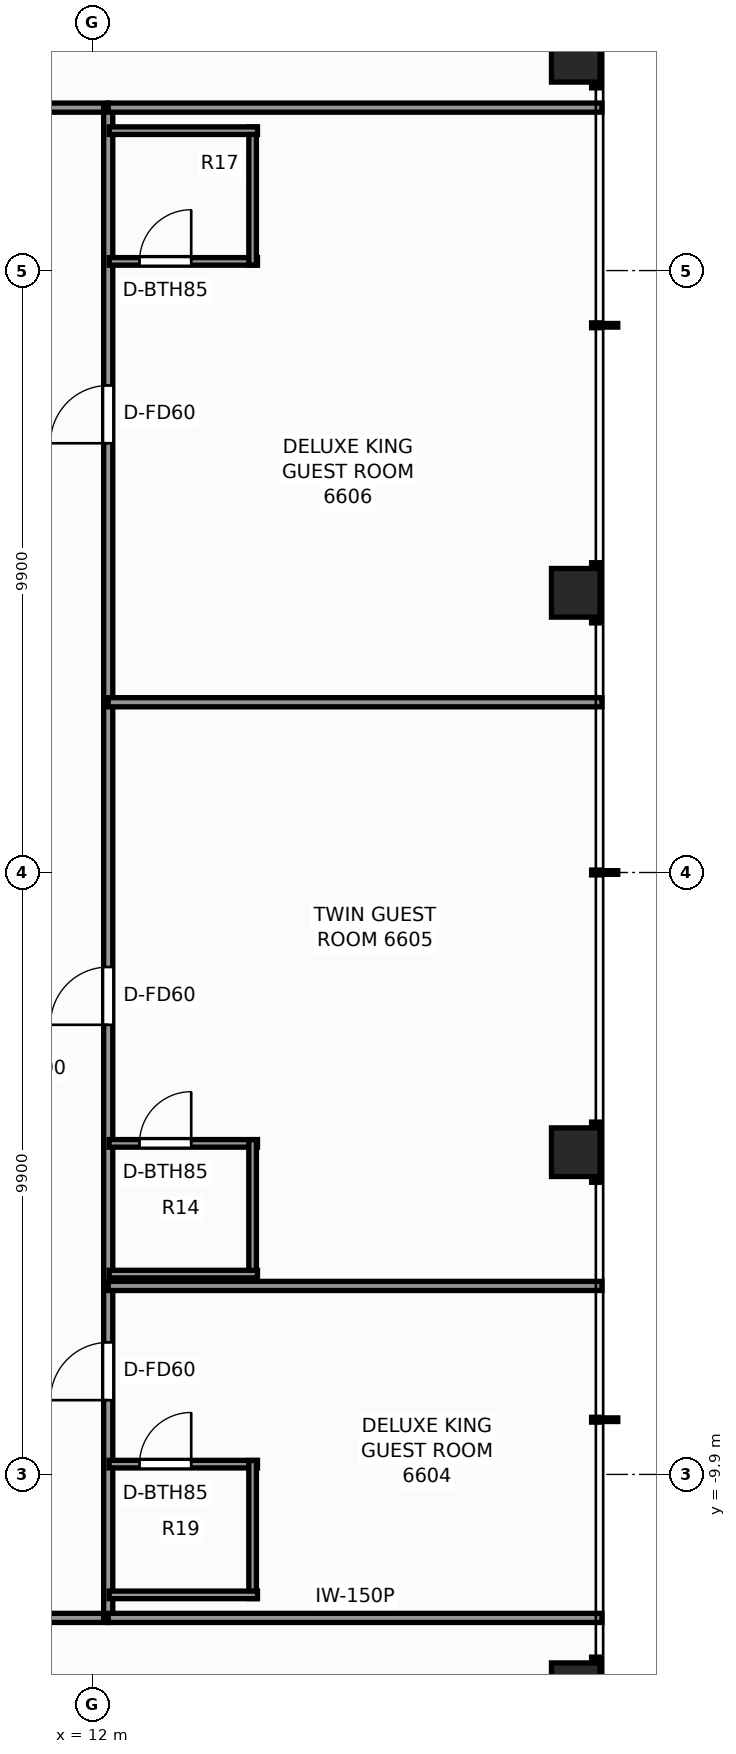
"""IFC4 building model, lengths in metres.
Left out: names, types, materials, properties, quantities, classifications, styles, units other than length and angle.
Written with IfcOpenShell. Run it as: python <this file> out.ifc"""

import sys

from ifc_helpers import new_model, si_unit, direction, frame, frame_2d, origin, origin_2d, place, context, subcontext, project, spatial, rectangle, extrude, element, fill, save


model = new_model("IFC4")
c1 = context("Model", 3, precision=1e-05, world=origin(), true_north=direction((0.0, 1.0)))
c2 = subcontext(c1, "Body", "Model", "MODEL_VIEW")
j1 = project(units=[si_unit("LENGTHUNIT", "METRE"), si_unit("PLANEANGLEUNIT", "RADIAN")], contexts=[c1])
p1 = place(None, origin())
s1 = spatial("IfcSite", under=j1, at=p1, CompositionType="ELEMENT")
p2 = place(p1, origin())
s2 = spatial("IfcBuilding", under=s1, at=p2, CompositionType="ELEMENT")
p3 = place(p2, frame((0.0, 0.0, 226.2)))
s3 = spatial("IfcBuildingStorey", under=s2, at=p3, CompositionType="ELEMENT", Elevation=226.2)
for number, where, z_axis, x_axis in (
    (1, (19.95, -13.4, 0.0), (0.0, 0.0, 1.0), (1.0, 0.0, 0.0)),
    (2, (19.95, -4.6, 0.0), (0.0, 0.0, 1.0), (1.0, 0.0, 0.0)),
    (3, (19.95, 4.6, 0.0), (0.0, 0.0, 1.0), (1.0, 0.0, 0.0)),
    (4, (19.95, 13.4, 0.0), (0.0, 0.0, 1.0), (1.0, 0.0, 0.0)),
):
    element("IfcColumn", number, at=place(p3, frame(where, z_axis=z_axis, x_axis=x_axis)), inside=s3, PredefinedType="COLUMN", context=c2, shape_type="SweptSolid", body=[
        extrude(rectangle(XDim=0.8, YDim=0.8, at=origin_2d()), origin(), (0.0, 0.0, 1.0), 3.3),
    ])
p4 = place(p3, frame((-12.42, -12.26, 0.0), z_axis=(0.0, 0.0, 1.0), x_axis=(1.0, 0.0, 0.0)))
e5 = element("IfcWall", 5, at=p4, inside=s3, PredefinedType="PARTITIONING", context=c2, shape_type="SweptSolid", body=[
    extrude(rectangle(XDim=24.68, YDim=0.15, at=frame_2d((12.34, 0.0))), origin(), (0.0, 0.0, 1.0), 2.369),
])
p5 = place(p4, frame((3.267, 0.0, 0.0)))
e6 = element("IfcOpeningElement", 6, at=p5, cuts=e5, PredefinedType="OPENING", context=c2, shape_type="SweptSolid", body=[
    extrude(rectangle(XDim=0.9, YDim=2.06, at=frame_2d((0.45, 1.03))), frame((0.0, 0.085, 0.0), z_axis=(0.0, -1.0, 0.0), x_axis=(1.0, 0.0, 0.0)), (0.0, 0.0, 1.0), 0.17),
])
p6 = place(p4, frame((9.94, 0.0, 0.0)))
e7 = element("IfcOpeningElement", 7, at=p6, cuts=e5, PredefinedType="OPENING", context=c2, shape_type="SweptSolid", body=[
    extrude(rectangle(XDim=0.9, YDim=2.06, at=frame_2d((0.45, 1.03))), frame((0.0, 0.085, 0.0), z_axis=(0.0, -1.0, 0.0), x_axis=(1.0, 0.0, 0.0)), (0.0, 0.0, 1.0), 0.17),
])
p7 = place(p4, frame((15.177, 0.0, 0.0)))
e8 = element("IfcOpeningElement", 8, at=p7, cuts=e5, PredefinedType="OPENING", context=c2, shape_type="SweptSolid", body=[
    extrude(rectangle(XDim=0.9, YDim=2.06, at=frame_2d((0.45, 1.03))), frame((0.0, 0.085, 0.0), z_axis=(0.0, -1.0, 0.0), x_axis=(1.0, 0.0, 0.0)), (0.0, 0.0, 1.0), 0.17),
])
p8 = place(p4, frame((18.4, 0.0, 0.0)))
e9 = element("IfcOpeningElement", 9, at=p8, cuts=e5, PredefinedType="OPENING", context=c2, shape_type="SweptSolid", body=[
    extrude(rectangle(XDim=0.95, YDim=2.06, at=frame_2d((0.475, 1.03))), frame((0.0, 0.085, 0.0), z_axis=(0.0, -1.0, 0.0), x_axis=(1.0, 0.0, 0.0)), (0.0, 0.0, 1.0), 0.17),
])
p9 = place(p4, frame((20.85, 0.0, 0.0)))
e10 = element("IfcOpeningElement", 10, at=p9, cuts=e5, PredefinedType="OPENING", context=c2, shape_type="SweptSolid", body=[
    extrude(rectangle(XDim=0.9, YDim=2.06, at=frame_2d((0.45, 1.03))), frame((0.0, 0.085, 0.0), z_axis=(0.0, -1.0, 0.0), x_axis=(1.0, 0.0, 0.0)), (0.0, 0.0, 1.0), 0.17),
])
p10 = place(p3, frame((-12.42, 12.58, 0.0), z_axis=(0.0, 0.0, 1.0), x_axis=(1.0, 0.0, 0.0)))
e11 = element("IfcWall", 11, at=p10, inside=s3, PredefinedType="PARTITIONING", context=c2, shape_type="SweptSolid", body=[
    extrude(rectangle(XDim=24.68, YDim=0.15, at=frame_2d((12.34, 0.0))), origin(), (0.0, 0.0, 1.0), 2.369),
])
p11 = place(p10, frame((3.267, 0.0, 0.0)))
e12 = element("IfcOpeningElement", 12, at=p11, cuts=e11, PredefinedType="OPENING", context=c2, shape_type="SweptSolid", body=[
    extrude(rectangle(XDim=0.9, YDim=2.06, at=frame_2d((0.45, 1.03))), frame((0.0, 0.085, 0.0), z_axis=(0.0, -1.0, 0.0), x_axis=(1.0, 0.0, 0.0)), (0.0, 0.0, 1.0), 0.17),
])
p12 = place(p10, frame((9.915, 0.0, 0.0)))
e13 = element("IfcOpeningElement", 13, at=p12, cuts=e11, PredefinedType="OPENING", context=c2, shape_type="SweptSolid", body=[
    extrude(rectangle(XDim=0.95, YDim=2.06, at=frame_2d((0.475, 1.03))), frame((0.0, 0.085, 0.0), z_axis=(0.0, -1.0, 0.0), x_axis=(1.0, 0.0, 0.0)), (0.0, 0.0, 1.0), 0.17),
])
p13 = place(p10, frame((18.587, 0.0, 0.0)))
e14 = element("IfcOpeningElement", 14, at=p13, cuts=e11, PredefinedType="OPENING", context=c2, shape_type="SweptSolid", body=[
    extrude(rectangle(XDim=0.95, YDim=2.06, at=frame_2d((0.475, 1.03))), frame((0.0, 0.085, 0.0), z_axis=(0.0, -1.0, 0.0), x_axis=(1.0, 0.0, 0.0)), (0.0, 0.0, 1.0), 0.17),
])
p14 = place(p10, frame((20.85, 0.0, 0.0)))
e15 = element("IfcOpeningElement", 15, at=p14, cuts=e11, PredefinedType="OPENING", context=c2, shape_type="SweptSolid", body=[
    extrude(rectangle(XDim=0.9, YDim=2.06, at=frame_2d((0.45, 1.03))), frame((0.0, 0.085, 0.0), z_axis=(0.0, -1.0, 0.0), x_axis=(1.0, 0.0, 0.0)), (0.0, 0.0, 1.0), 0.17),
])
p15 = place(p3, frame((12.26, -12.26, 0.0), z_axis=(0.0, 0.0, 1.0), x_axis=(0.0, 1.0, 0.0)))
e16 = element("IfcWall", 16, at=p15, inside=s3, PredefinedType="PARTITIONING", context=c2, shape_type="SweptSolid", body=[
    extrude(rectangle(XDim=24.84, YDim=0.15, at=frame_2d((12.42, 0.0))), origin(), (0.0, 0.0, 1.0), 2.369),
])
p16 = place(p15, frame((3.581, 0.0, 0.0)))
e17 = element("IfcOpeningElement", 17, at=p16, cuts=e16, PredefinedType="OPENING", context=c2, shape_type="SweptSolid", body=[
    extrude(rectangle(XDim=0.95, YDim=2.06, at=frame_2d((0.475, 1.03))), frame((0.0, 0.085, 0.0), z_axis=(0.0, -1.0, 0.0), x_axis=(1.0, 0.0, 0.0)), (0.0, 0.0, 1.0), 0.17),
])
p17 = place(p15, frame((9.755, 0.0, 0.0)))
e18 = element("IfcOpeningElement", 18, at=p17, cuts=e16, PredefinedType="OPENING", context=c2, shape_type="SweptSolid", body=[
    extrude(rectangle(XDim=0.95, YDim=2.06, at=frame_2d((0.475, 1.03))), frame((0.0, 0.085, 0.0), z_axis=(0.0, -1.0, 0.0), x_axis=(1.0, 0.0, 0.0)), (0.0, 0.0, 1.0), 0.17),
])
p18 = place(p15, frame((19.32, 0.0, 0.0)))
e19 = element("IfcOpeningElement", 19, at=p18, cuts=e16, PredefinedType="OPENING", context=c2, shape_type="SweptSolid", body=[
    extrude(rectangle(XDim=0.95, YDim=2.06, at=frame_2d((0.475, 1.03))), frame((0.0, 0.085, 0.0), z_axis=(0.0, -1.0, 0.0), x_axis=(1.0, 0.0, 0.0)), (0.0, 0.0, 1.0), 0.17),
])
for number, where, z_axis, x_axis in (
    (20, (12.26, -12.26, 0.0), (0.0, 0.0, 1.0), (1.0, 0.0, 0.0)),
    (21, (12.26, 12.58, 0.0), (0.0, 0.0, 1.0), (1.0, 0.0, 0.0)),
):
    element("IfcWall", number, at=place(p3, frame(where, z_axis=z_axis, x_axis=x_axis)), inside=s3, PredefinedType="PARTITIONING", context=c2, shape_type="SweptSolid", body=[
        extrude(rectangle(XDim=8.12, YDim=0.15, at=frame_2d((4.06, 0.0))), origin(), (0.0, 0.0, 1.0), 2.369),
    ])
p19 = place(p3, frame((12.26, -6.8, 0.0), z_axis=(0.0, 0.0, 1.0), x_axis=(1.0, 0.0, 0.0)))
e22 = element("IfcWall", 22, at=p19, inside=s3, PredefinedType="PARTITIONING", context=c2, shape_type="SweptSolid", body=[
    extrude(rectangle(XDim=8.12, YDim=0.15, at=frame_2d((4.06, 0.0))), origin(), (0.0, 0.0, 1.0), 2.453),
])
p20 = place(p3, frame((12.275, -9.731, 0.0), z_axis=(0.0, 0.0, 1.0), x_axis=(1.0, 0.0, 0.0)))
e23 = element("IfcWall", 23, at=p20, inside=s3, PredefinedType="PARTITIONING", context=c2, shape_type="SweptSolid", body=[
    extrude(rectangle(XDim=2.44, YDim=0.125, at=frame_2d((1.22, 0.0))), origin(), (0.0, 0.0, 1.0), 3.08),
])
p21 = place(p20, frame((0.5, 0.0, 0.0)))
e24 = element("IfcOpeningElement", 24, at=p21, cuts=e23, PredefinedType="OPENING", context=c2, shape_type="SweptSolid", body=[
    extrude(rectangle(XDim=0.85, YDim=2.03, at=frame_2d((0.425, 1.015))), frame((0.0, 0.073, 0.0), z_axis=(0.0, -1.0, 0.0), x_axis=(1.0, 0.0, 0.0)), (0.0, 0.0, 1.0), 0.145),
])
p22 = place(p3, frame((14.635, -11.941, 0.0), z_axis=(0.0, 0.0, 1.0), x_axis=(0.0, 1.0, 0.0)))
e25 = element("IfcWall", 25, at=p22, inside=s3, PredefinedType="PARTITIONING", context=c2, shape_type="SweptSolid", body=[
    extrude(rectangle(XDim=2.27, YDim=0.125, at=frame_2d((1.135, 0.0))), origin(), (0.0, 0.0, 1.0), 2.369),
])
p23 = place(p3, frame((12.275, -11.881, 0.0), z_axis=(0.0, 0.0, 1.0), x_axis=(1.0, 0.0, 0.0)))
e26 = element("IfcWall", 26, at=p23, inside=s3, PredefinedType="PARTITIONING", context=c2, shape_type="SweptSolid", body=[
    extrude(rectangle(XDim=2.44, YDim=0.125, at=frame_2d((1.22, 0.0))), origin(), (0.0, 0.0, 1.0), 3.08),
])
p24 = place(p3, frame((12.26, 2.8, 0.0), z_axis=(0.0, 0.0, 1.0), x_axis=(1.0, 0.0, 0.0)))
e27 = element("IfcWall", 27, at=p24, inside=s3, PredefinedType="PARTITIONING", context=c2, shape_type="SweptSolid", body=[
    extrude(rectangle(XDim=8.12, YDim=0.15, at=frame_2d((4.06, 0.0))), origin(), (0.0, 0.0, 1.0), 2.453),
])
p25 = place(p3, frame((12.275, -4.455, 0.0), z_axis=(0.0, 0.0, 1.0), x_axis=(1.0, 0.0, 0.0)))
e28 = element("IfcWall", 28, at=p25, inside=s3, PredefinedType="PARTITIONING", context=c2, shape_type="SweptSolid", body=[
    extrude(rectangle(XDim=2.44, YDim=0.125, at=frame_2d((1.22, 0.0))), origin(), (0.0, 0.0, 1.0), 2.369),
])
p26 = place(p25, frame((0.5, 0.0, 0.0)))
e29 = element("IfcOpeningElement", 29, at=p26, cuts=e28, PredefinedType="OPENING", context=c2, shape_type="SweptSolid", body=[
    extrude(rectangle(XDim=0.85, YDim=2.03, at=frame_2d((0.425, 1.015))), frame((0.0, 0.073, 0.0), z_axis=(0.0, -1.0, 0.0), x_axis=(1.0, 0.0, 0.0)), (0.0, 0.0, 1.0), 0.145),
])
p27 = place(p3, frame((14.635, -6.665, 0.0), z_axis=(0.0, 0.0, 1.0), x_axis=(0.0, 1.0, 0.0)))
e30 = element("IfcWall", 30, at=p27, inside=s3, PredefinedType="PARTITIONING", context=c2, shape_type="SweptSolid", body=[
    extrude(rectangle(XDim=2.27, YDim=0.125, at=frame_2d((1.135, 0.0))), origin(), (0.0, 0.0, 1.0), 2.369),
])
p28 = place(p3, frame((12.275, -6.605, 0.0), z_axis=(0.0, 0.0, 1.0), x_axis=(1.0, 0.0, 0.0)))
e31 = element("IfcWall", 31, at=p28, inside=s3, PredefinedType="PARTITIONING", context=c2, shape_type="SweptSolid", body=[
    extrude(rectangle(XDim=2.44, YDim=0.125, at=frame_2d((1.22, 0.0))), origin(), (0.0, 0.0, 1.0), 3.08),
])
p29 = place(p3, frame((12.275, 10.051, 0.0), z_axis=(0.0, 0.0, 1.0), x_axis=(1.0, 0.0, 0.0)))
e32 = element("IfcWall", 32, at=p29, inside=s3, PredefinedType="PARTITIONING", context=c2, shape_type="SweptSolid", body=[
    extrude(rectangle(XDim=2.44, YDim=0.125, at=frame_2d((1.22, 0.0))), origin(), (0.0, 0.0, 1.0), 3.08),
])
p30 = place(p29, frame((0.5, 0.0, 0.0)))
e33 = element("IfcOpeningElement", 33, at=p30, cuts=e32, PredefinedType="OPENING", context=c2, shape_type="SweptSolid", body=[
    extrude(rectangle(XDim=0.85, YDim=2.03, at=frame_2d((0.425, 1.015))), frame((0.0, 0.073, 0.0), z_axis=(0.0, -1.0, 0.0), x_axis=(1.0, 0.0, 0.0)), (0.0, 0.0, 1.0), 0.145),
])
p31 = place(p3, frame((14.635, 9.991, 0.0), z_axis=(0.0, 0.0, 1.0), x_axis=(0.0, 1.0, 0.0)))
e34 = element("IfcWall", 34, at=p31, inside=s3, PredefinedType="PARTITIONING", context=c2, shape_type="SweptSolid", body=[
    extrude(rectangle(XDim=2.27, YDim=0.125, at=frame_2d((1.135, 0.0))), origin(), (0.0, 0.0, 1.0), 2.369),
])
p32 = place(p3, frame((12.275, 12.201, 0.0), z_axis=(0.0, 0.0, 1.0), x_axis=(1.0, 0.0, 0.0)))
e35 = element("IfcWall", 35, at=p32, inside=s3, PredefinedType="PARTITIONING", context=c2, shape_type="SweptSolid", body=[
    extrude(rectangle(XDim=2.44, YDim=0.125, at=frame_2d((1.22, 0.0))), origin(), (0.0, 0.0, 1.0), 3.08),
])
p33 = place(p21, origin())
e36 = element("IfcDoor", 36, at=p33, inside=s3, OperationType="SINGLE_SWING_RIGHT", PredefinedType="DOOR", context=c2, shape_type="SweptSolid", body=[
    extrude(rectangle(XDim=0.85, YDim=2.03, at=frame_2d((0.425, 1.015))), frame((0.0, 0.025, 0.0), z_axis=(0.0, -1.0, 0.0), x_axis=(1.0, 0.0, 0.0)), (0.0, 0.0, 1.0), 0.05),
])
fill(e24, e36)
p34 = place(p16, origin())
e37 = element("IfcDoor", 37, at=p34, inside=s3, OperationType="SINGLE_SWING_LEFT", PredefinedType="DOOR", context=c2, shape_type="SweptSolid", body=[
    extrude(rectangle(XDim=0.95, YDim=2.06, at=frame_2d((0.475, 1.03))), frame((0.0, 0.025, 0.0), z_axis=(0.0, -1.0, 0.0), x_axis=(1.0, 0.0, 0.0)), (0.0, 0.0, 1.0), 0.05),
])
fill(e17, e37)
p35 = place(p26, origin())
e38 = element("IfcDoor", 38, at=p35, inside=s3, OperationType="SINGLE_SWING_RIGHT", PredefinedType="DOOR", context=c2, shape_type="SweptSolid", body=[
    extrude(rectangle(XDim=0.85, YDim=2.03, at=frame_2d((0.425, 1.015))), frame((0.0, 0.025, 0.0), z_axis=(0.0, -1.0, 0.0), x_axis=(1.0, 0.0, 0.0)), (0.0, 0.0, 1.0), 0.05),
])
fill(e29, e38)
p36 = place(p17, origin())
e39 = element("IfcDoor", 39, at=p36, inside=s3, OperationType="SINGLE_SWING_LEFT", PredefinedType="DOOR", context=c2, shape_type="SweptSolid", body=[
    extrude(rectangle(XDim=0.95, YDim=2.06, at=frame_2d((0.475, 1.03))), frame((0.0, 0.025, 0.0), z_axis=(0.0, -1.0, 0.0), x_axis=(1.0, 0.0, 0.0)), (0.0, 0.0, 1.0), 0.05),
])
fill(e18, e39)
p37 = place(p30, origin())
e40 = element("IfcDoor", 40, at=p37, inside=s3, OperationType="SINGLE_SWING_RIGHT", PredefinedType="DOOR", context=c2, shape_type="SweptSolid", body=[
    extrude(rectangle(XDim=0.85, YDim=2.03, at=frame_2d((0.425, 1.015))), frame((0.0, 0.025, 0.0), z_axis=(0.0, -1.0, 0.0), x_axis=(1.0, 0.0, 0.0)), (0.0, 0.0, 1.0), 0.05),
])
fill(e33, e40)
p38 = place(p18, origin())
e41 = element("IfcDoor", 41, at=p38, inside=s3, OperationType="SINGLE_SWING_LEFT", PredefinedType="DOOR", context=c2, shape_type="SweptSolid", body=[
    extrude(rectangle(XDim=0.95, YDim=2.06, at=frame_2d((0.475, 1.03))), frame((0.0, 0.025, 0.0), z_axis=(0.0, -1.0, 0.0), x_axis=(1.0, 0.0, 0.0)), (0.0, 0.0, 1.0), 0.05),
])
fill(e19, e41)
save(model, sys.argv[1])
